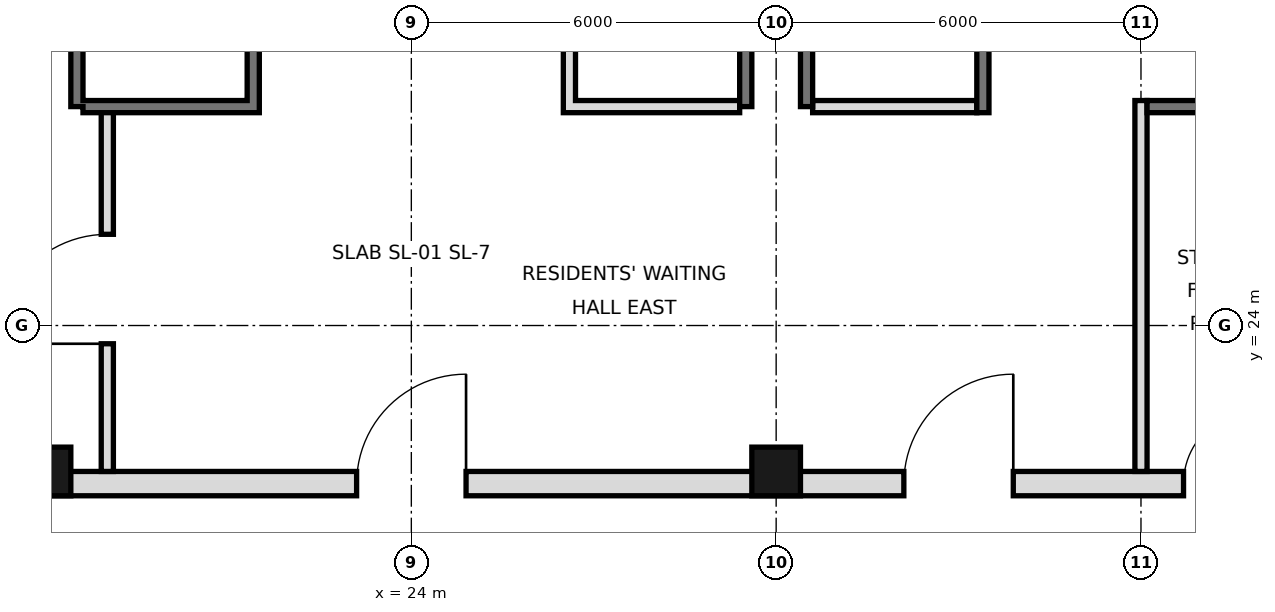
"""IFC4 building model, lengths in metres.
Left out: names, types, materials, properties, quantities, classifications, styles, units other than length and angle.
Written with IfcOpenShell. Run it as: python <this file> out.ifc"""

import sys

from ifc_helpers import new_model, si_unit, direction, frame, frame_2d, origin, origin_2d, place, context, subcontext, project, spatial, rectangle, hollow_rectangle, extrude, element, fill, save


model = new_model("IFC4")
c1 = context("Model", 3, precision=1e-05, world=origin(), true_north=direction((0.0, 1.0)))
c2 = subcontext(c1, "Body", "Model", "MODEL_VIEW")
j1 = project(units=[si_unit("LENGTHUNIT", "METRE"), si_unit("PLANEANGLEUNIT", "RADIAN")], contexts=[c1])
p1 = place(None, origin())
s1 = spatial("IfcSite", under=j1, at=p1, CompositionType="ELEMENT")
p2 = place(p1, origin())
s2 = spatial("IfcBuilding", under=s1, at=p2, CompositionType="ELEMENT")
p3 = place(p2, frame((0.0, 0.0, 103.4)))
s3 = spatial("IfcBuildingStorey", under=s2, at=p3, CompositionType="ELEMENT", Elevation=103.4)
for number, where, z_axis, x_axis in (
    (1, (18.0, 21.6, 0.0), (0.0, 0.0, 1.0), (1.0, 0.0, 0.0)),
    (2, (30.0, 21.6, 0.0), (0.0, 0.0, 1.0), (1.0, 0.0, 0.0)),
):
    element("IfcColumn", number, at=place(p3, frame(where, z_axis=z_axis, x_axis=x_axis)), inside=s3, PredefinedType="COLUMN", context=c2, shape_type="SweptSolid", body=[
        extrude(hollow_rectangle(XDim=0.8, YDim=0.8, WallThickness=0.05, at=origin_2d()), origin(), (0.0, 0.0, 1.0), 3.6),
    ])
for number, where, z_axis, x_axis in (
    (3, (18.5, 27.6, 0.0), (0.0, 0.0, 1.0), (0.0, 1.0, 0.0)),
    (4, (29.5, 27.6, 0.0), (0.0, 0.0, 1.0), (0.0, 1.0, 0.0)),
    (5, (30.5, 27.6, 0.0), (0.0, 0.0, 1.0), (0.0, 1.0, 0.0)),
):
    element("IfcWall", number, at=place(p3, frame(where, z_axis=z_axis, x_axis=x_axis)), inside=s3, PredefinedType="SOLIDWALL", context=c2, shape_type="SweptSolid", body=[
        extrude(rectangle(XDim=17.5, YDim=0.2, at=frame_2d((8.75, 0.0))), origin(), (0.0, 0.0, 1.0), 3.42),
    ])
p4 = place(p3, frame((5.6, 21.4, 0.0), z_axis=(0.0, 0.0, 1.0), x_axis=(1.0, 0.0, 0.0)))
e6 = element("IfcWall", 6, at=p4, inside=s3, PredefinedType="SOLIDWALL", context=c2, shape_type="SweptSolid", body=[
    extrude(rectangle(XDim=36.8, YDim=0.4, at=frame_2d((18.4, 0.0))), origin(), (0.0, 0.0, 1.0), 3.42),
])
p5 = place(p4, frame((8.5, 0.0, 0.0)))
e7 = element("IfcOpeningElement", 7, at=p5, cuts=e6, PredefinedType="OPENING", context=c2, shape_type="SweptSolid", body=[
    extrude(rectangle(XDim=1.8, YDim=2.1, at=frame_2d((0.9, 1.05))), frame((0.0, 0.21, 0.0), z_axis=(0.0, -1.0, 0.0), x_axis=(1.0, 0.0, 0.0)), (0.0, 0.0, 1.0), 0.42),
])
p6 = place(p4, frame((17.5, 0.0, 0.0)))
e8 = element("IfcOpeningElement", 8, at=p6, cuts=e6, PredefinedType="OPENING", context=c2, shape_type="SweptSolid", body=[
    extrude(rectangle(XDim=1.8, YDim=2.1, at=frame_2d((0.9, 1.05))), frame((0.0, 0.21, 0.0), z_axis=(0.0, -1.0, 0.0), x_axis=(1.0, 0.0, 0.0)), (0.0, 0.0, 1.0), 0.42),
])
p7 = place(p4, frame((26.5, 0.0, 0.0)))
e9 = element("IfcOpeningElement", 9, at=p7, cuts=e6, PredefinedType="OPENING", context=c2, shape_type="SweptSolid", body=[
    extrude(rectangle(XDim=1.8, YDim=2.1, at=frame_2d((0.9, 1.05))), frame((0.0, 0.21, 0.0), z_axis=(0.0, -1.0, 0.0), x_axis=(1.0, 0.0, 0.0)), (0.0, 0.0, 1.0), 0.42),
])
p8 = place(p4, frame((4.5, 0.0, 0.0)))
e10 = element("IfcOpeningElement", 10, at=p8, cuts=e6, PredefinedType="OPENING", context=c2, shape_type="SweptSolid", body=[
    extrude(rectangle(XDim=1.2, YDim=2.1, at=frame_2d((0.6, 1.05))), frame((0.0, 0.21, 0.0), z_axis=(0.0, -1.0, 0.0), x_axis=(1.0, 0.0, 0.0)), (0.0, 0.0, 1.0), 0.42),
])
p9 = place(p4, frame((31.1, 0.0, 0.0)))
e11 = element("IfcOpeningElement", 11, at=p9, cuts=e6, PredefinedType="OPENING", context=c2, shape_type="SweptSolid", body=[
    extrude(rectangle(XDim=1.2, YDim=2.1, at=frame_2d((0.6, 1.05))), frame((0.0, 0.21, 0.0), z_axis=(0.0, -1.0, 0.0), x_axis=(1.0, 0.0, 0.0)), (0.0, 0.0, 1.0), 0.42),
])
p10 = place(p3, frame((19.0, 21.6, 0.0), z_axis=(0.0, 0.0, 1.0), x_axis=(0.0, 1.0, 0.0)))
e12 = element("IfcWall", 12, at=p10, inside=s3, PredefinedType="PARTITIONING", context=c2, shape_type="SweptSolid", body=[
    extrude(rectangle(XDim=6.0, YDim=0.2, at=frame_2d((3.0, 0.0))), origin(), (0.0, 0.0, 1.0), 3.42),
])
p11 = place(p10, frame((2.1, 0.0, 0.0)))
e13 = element("IfcOpeningElement", 13, at=p11, cuts=e12, PredefinedType="OPENING", context=c2, shape_type="SweptSolid", body=[
    extrude(rectangle(XDim=1.8, YDim=2.1, at=frame_2d((0.9, 1.05))), frame((0.0, 0.11, 0.0), z_axis=(0.0, -1.0, 0.0), x_axis=(1.0, 0.0, 0.0)), (0.0, 0.0, 1.0), 0.22),
])
p12 = place(p3, frame((21.4, 27.5, 0.0), z_axis=(0.0, 0.0, 1.0), x_axis=(0.0, 1.0, 0.0)))
e14 = element("IfcWall", 14, at=p12, inside=s3, PredefinedType="SOLIDWALL", context=c2, shape_type="SweptSolid", body=[
    extrude(rectangle(XDim=17.5, YDim=0.2, at=frame_2d((8.75, 0.0))), origin(), (0.0, 0.0, 1.0), 3.42),
])
p13 = place(p12, frame((16.2, 0.0, 0.0)))
e15 = element("IfcOpeningElement", 15, at=p13, cuts=e14, PredefinedType="OPENING", context=c2, shape_type="SweptSolid", body=[
    extrude(rectangle(XDim=1.0, YDim=2.1, at=frame_2d((0.5, 1.05))), frame((0.0, 0.11, 0.0), z_axis=(0.0, -1.0, 0.0), x_axis=(1.0, 0.0, 0.0)), (0.0, 0.0, 1.0), 0.22),
])
p14 = place(p12, frame((7.4, 0.0, 0.0)))
e16 = element("IfcOpeningElement", 16, at=p14, cuts=e14, PredefinedType="OPENING", context=c2, shape_type="SweptSolid", body=[
    extrude(rectangle(XDim=0.9, YDim=2.1, at=frame_2d((0.45, 1.05))), frame((0.0, 0.11, 0.0), z_axis=(0.0, -1.0, 0.0), x_axis=(1.0, 0.0, 0.0)), (0.0, 0.0, 1.0), 0.22),
])
p15 = place(p3, frame((26.6, 27.5, 0.0), z_axis=(0.0, 0.0, 1.0), x_axis=(0.0, 1.0, 0.0)))
e17 = element("IfcWall", 17, at=p15, inside=s3, PredefinedType="SOLIDWALL", context=c2, shape_type="SweptSolid", body=[
    extrude(rectangle(XDim=17.5, YDim=0.2, at=frame_2d((8.75, 0.0))), origin(), (0.0, 0.0, 1.0), 3.42),
])
p16 = place(p15, frame((4.3, 0.0, 0.0)))
e18 = element("IfcOpeningElement", 18, at=p16, cuts=e17, PredefinedType="OPENING", context=c2, shape_type="SweptSolid", body=[
    extrude(rectangle(XDim=0.9, YDim=2.1, at=frame_2d((0.45, 1.05))), frame((0.0, 0.11, 0.0), z_axis=(0.0, -1.0, 0.0), x_axis=(1.0, 0.0, 0.0)), (0.0, 0.0, 1.0), 0.22),
])
p17 = place(p15, frame((10.35, 0.0, 0.0)))
e19 = element("IfcOpeningElement", 19, at=p17, cuts=e17, PredefinedType="OPENING", context=c2, shape_type="SweptSolid", body=[
    extrude(rectangle(XDim=1.0, YDim=2.1, at=frame_2d((0.5, 1.05))), frame((0.0, 0.11, 0.0), z_axis=(0.0, -1.0, 0.0), x_axis=(1.0, 0.0, 0.0)), (0.0, 0.0, 1.0), 0.22),
])
p18 = place(p3, frame((33.4, 27.5, 0.0), z_axis=(0.0, 0.0, 1.0), x_axis=(0.0, 1.0, 0.0)))
e20 = element("IfcWall", 20, at=p18, inside=s3, PredefinedType="SOLIDWALL", context=c2, shape_type="SweptSolid", body=[
    extrude(rectangle(XDim=17.5, YDim=0.2, at=frame_2d((8.75, 0.0))), origin(), (0.0, 0.0, 1.0), 3.42),
])
p19 = place(p18, frame((15.4, 0.0, 0.0)))
e21 = element("IfcOpeningElement", 21, at=p19, cuts=e20, PredefinedType="OPENING", context=c2, shape_type="SweptSolid", body=[
    extrude(rectangle(XDim=1.1, YDim=2.1, at=frame_2d((0.55, 1.05))), frame((0.0, 0.11, 0.0), z_axis=(0.0, -1.0, 0.0), x_axis=(1.0, 0.0, 0.0)), (0.0, 0.0, 1.0), 0.22),
])
p20 = place(p18, frame((2.7, 0.0, 0.0)))
e22 = element("IfcOpeningElement", 22, at=p20, cuts=e20, PredefinedType="OPENING", context=c2, shape_type="SweptSolid", body=[
    extrude(rectangle(XDim=1.0, YDim=2.1, at=frame_2d((0.5, 1.05))), frame((0.0, 0.11, 0.0), z_axis=(0.0, -1.0, 0.0), x_axis=(1.0, 0.0, 0.0)), (0.0, 0.0, 1.0), 0.22),
])
p21 = place(p18, frame((9.9, 0.0, 0.0)))
e23 = element("IfcOpeningElement", 23, at=p21, cuts=e20, PredefinedType="OPENING", context=c2, shape_type="SweptSolid", body=[
    extrude(rectangle(XDim=0.9, YDim=2.1, at=frame_2d((0.45, 1.05))), frame((0.0, 0.11, 0.0), z_axis=(0.0, -1.0, 0.0), x_axis=(1.0, 0.0, 0.0)), (0.0, 0.0, 1.0), 0.22),
])
p22 = place(p3, frame((36.0, 21.6, 0.0), z_axis=(0.0, 0.0, 1.0), x_axis=(0.0, 1.0, 0.0)))
e24 = element("IfcWall", 24, at=p22, inside=s3, PredefinedType="PARTITIONING", context=c2, shape_type="SweptSolid", body=[
    extrude(rectangle(XDim=6.1, YDim=0.2, at=frame_2d((3.05, 0.0))), origin(), (0.0, 0.0, 1.0), 3.42),
])
for number, where, z_axis, x_axis in (
    (25, (18.6, 27.6, 0.0), (0.0, 0.0, 1.0), (1.0, 0.0, 0.0)),
    (26, (26.7, 27.6, 0.0), (0.0, 0.0, 1.0), (1.0, 0.0, 0.0)),
):
    element("IfcWall", number, at=place(p3, frame(where, z_axis=z_axis, x_axis=x_axis)), inside=s3, PredefinedType="SOLIDWALL", context=c2, shape_type="SweptSolid", body=[
        extrude(rectangle(XDim=2.7, YDim=0.2, at=frame_2d((1.35, 0.0))), origin(), (0.0, 0.0, 1.0), 3.42),
    ])
p23 = place(p3, frame((30.6, 27.6, 0.0), z_axis=(0.0, 0.0, 1.0), x_axis=(1.0, 0.0, 0.0)))
e27 = element("IfcWall", 27, at=p23, inside=s3, PredefinedType="PARTITIONING", context=c2, shape_type="SweptSolid", body=[
    extrude(rectangle(XDim=2.7, YDim=0.2, at=frame_2d((1.35, 0.0))), origin(), (0.0, 0.0, 1.0), 3.42),
])
p24 = place(p3, frame((36.1, 27.6, 0.0), z_axis=(0.0, 0.0, 1.0), x_axis=(1.0, 0.0, 0.0)))
e28 = element("IfcWall", 28, at=p24, inside=s3, PredefinedType="SOLIDWALL", context=c2, shape_type="SweptSolid", body=[
    extrude(rectangle(XDim=5.3, YDim=0.2, at=frame_2d((2.65, 0.0))), origin(), (0.0, 0.0, 1.0), 3.42),
])
p25 = place(p11, origin())
e29 = element("IfcDoor", 29, at=p25, inside=s3, OperationType="SINGLE_SWING_LEFT", PredefinedType="DOOR", context=c2, shape_type="SweptSolid", body=[
    extrude(rectangle(XDim=1.8, YDim=2.1, at=frame_2d((0.9, 1.05))), frame((0.0, 0.025, 0.0), z_axis=(0.0, -1.0, 0.0), x_axis=(1.0, 0.0, 0.0)), (0.0, 0.0, 1.0), 0.05),
])
fill(e13, e29)
p26 = place(p6, frame((1.8, 0.0, 0.0), z_axis=(0.0, 0.0, 1.0), x_axis=(-1.0, 0.0, 0.0)))
e30 = element("IfcDoor", 30, at=p26, inside=s3, OperationType="SINGLE_SWING_LEFT", PredefinedType="DOOR", context=c2, shape_type="SweptSolid", body=[
    extrude(rectangle(XDim=1.8, YDim=2.1, at=frame_2d((0.9, 1.05))), frame((0.0, 0.025, 0.0), z_axis=(0.0, -1.0, 0.0), x_axis=(1.0, 0.0, 0.0)), (0.0, 0.0, 1.0), 0.05),
])
fill(e8, e30)
p27 = place(p7, frame((1.8, 0.0, 0.0), z_axis=(0.0, 0.0, 1.0), x_axis=(-1.0, 0.0, 0.0)))
e31 = element("IfcDoor", 31, at=p27, inside=s3, OperationType="SINGLE_SWING_LEFT", PredefinedType="DOOR", context=c2, shape_type="SweptSolid", body=[
    extrude(rectangle(XDim=1.8, YDim=2.1, at=frame_2d((0.9, 1.05))), frame((0.0, 0.025, 0.0), z_axis=(0.0, -1.0, 0.0), x_axis=(1.0, 0.0, 0.0)), (0.0, 0.0, 1.0), 0.05),
])
fill(e9, e31)
p28 = place(p9, frame((1.2, 0.0, 0.0), z_axis=(0.0, 0.0, 1.0), x_axis=(-1.0, 0.0, 0.0)))
e32 = element("IfcDoor", 32, at=p28, inside=s3, OperationType="SINGLE_SWING_LEFT", PredefinedType="DOOR", context=c2, shape_type="SweptSolid", body=[
    extrude(rectangle(XDim=1.2, YDim=2.1, at=frame_2d((0.6, 1.05))), frame((0.0, 0.025, 0.0), z_axis=(0.0, -1.0, 0.0), x_axis=(1.0, 0.0, 0.0)), (0.0, 0.0, 1.0), 0.05),
])
fill(e11, e32)
save(model, sys.argv[1])
